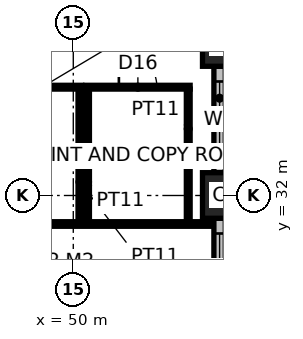
"""IFC4 building model, lengths in metres.
Left out: names, types, materials, properties, quantities, classifications, styles, units other than length and angle.
Written with IfcOpenShell. Run it as: python <this file> out.ifc"""

import sys

from ifc_helpers import new_model, si_unit, direction, frame, frame_2d, origin, origin_2d, place, context, subcontext, project, spatial, rectangle, hollow_rectangle, extrude, element, fill, save


model = new_model("IFC4")
c1 = context("Model", 3, precision=1e-05, world=origin(), true_north=direction((0.0, 1.0)))
c2 = subcontext(c1, "Body", "Model", "MODEL_VIEW")
j1 = project(units=[si_unit("LENGTHUNIT", "METRE"), si_unit("PLANEANGLEUNIT", "RADIAN")], contexts=[c1])
p1 = place(None, origin())
s1 = spatial("IfcSite", under=j1, at=p1, CompositionType="ELEMENT")
p2 = place(p1, origin())
s2 = spatial("IfcBuilding", under=s1, at=p2, CompositionType="ELEMENT")
p3 = place(p2, frame((0.0, 0.0, 51.0)))
s3 = spatial("IfcBuildingStorey", under=s2, at=p3, CompositionType="ELEMENT", Elevation=51.0)
for number, where, z_axis, x_axis in (
    (1, (54.0, 32.0, 0.0), (0.0, 0.0, 1.0), (1.0, 0.0, 0.0)),
    (2, (54.0, 36.0, 0.0), (0.0, 0.0, 1.0), (1.0, 0.0, 0.0)),
):
    element("IfcColumn", number, at=place(p3, frame(where, z_axis=z_axis, x_axis=x_axis)), inside=s3, PredefinedType="COLUMN", context=c2, shape_type="SweptSolid", body=[
        extrude(hollow_rectangle(XDim=1.2, YDim=1.2, WallThickness=0.1, at=origin_2d()), origin(), (0.0, 0.0, 1.0), 4.0),
    ])
p4 = place(p3, frame((44.375, 31.25, 0.0), z_axis=(0.0, 0.0, 1.0), x_axis=(1.0, 0.0, 0.0)))
e3 = element("IfcWall", 3, at=p4, inside=s3, PredefinedType="PARTITIONING", context=c2, shape_type="SweptSolid", body=[
    extrude(rectangle(XDim=9.325, YDim=0.12, at=frame_2d((4.663, 0.0))), origin(), (0.0, 0.0, 1.0), 3.85),
])
p5 = place(p3, frame((46.725, 34.85, 0.0), z_axis=(0.0, 0.0, 1.0), x_axis=(1.0, 0.0, 0.0)))
e4 = element("IfcWall", 4, at=p5, inside=s3, PredefinedType="PARTITIONING", context=c2, shape_type="SweptSolid", body=[
    extrude(rectangle(XDim=3.5, YDim=0.1, at=frame_2d((1.75, 0.0))), origin(), (0.0, 0.0, 1.0), 3.85),
])
p6 = place(p5, frame((1.25, 0.0, 0.0)))
e5 = element("IfcOpeningElement", 5, at=p6, cuts=e4, PredefinedType="OPENING", context=c2, shape_type="SweptSolid", body=[
    extrude(rectangle(XDim=1.0, YDim=2.2, at=frame_2d((0.5, 1.1))), frame((0.0, 0.06, 0.0), z_axis=(0.0, -1.0, 0.0), x_axis=(1.0, 0.0, 0.0)), (0.0, 0.0, 1.0), 0.12),
])
p7 = place(p3, frame((50.325, 34.85, 0.0), z_axis=(0.0, 0.0, 1.0), x_axis=(1.0, 0.0, 0.0)))
e6 = element("IfcWall", 6, at=p7, inside=s3, PredefinedType="PARTITIONING", context=c2, shape_type="SweptSolid", body=[
    extrude(rectangle(XDim=2.75, YDim=0.1, at=frame_2d((1.375, 0.0))), origin(), (0.0, 0.0, 1.0), 3.85),
])
p8 = place(p7, frame((0.875, 0.0, 0.0)))
e7 = element("IfcOpeningElement", 7, at=p8, cuts=e6, PredefinedType="OPENING", context=c2, shape_type="SweptSolid", body=[
    extrude(rectangle(XDim=1.0, YDim=2.2, at=frame_2d((0.5, 1.1))), frame((0.0, 0.06, 0.0), z_axis=(0.0, -1.0, 0.0), x_axis=(1.0, 0.0, 0.0)), (0.0, 0.0, 1.0), 0.12),
])
for number, where, z_axis, x_axis in (
    (8, (50.175, 31.31, 0.0), (0.0, 0.0, 1.0), (0.0, 1.0, 0.0)),
    (9, (50.375, 31.31, 0.0), (0.0, 0.0, 1.0), (0.0, 1.0, 0.0)),
    (10, (53.025, 31.31, 0.0), (0.0, 0.0, 1.0), (0.0, 1.0, 0.0)),
):
    element("IfcWall", number, at=place(p3, frame(where, z_axis=z_axis, x_axis=x_axis)), inside=s3, PredefinedType="PARTITIONING", context=c2, shape_type="SweptSolid", body=[
        extrude(rectangle(XDim=3.49, YDim=0.1, at=frame_2d((1.745, 0.0))), origin(), (0.0, 0.0, 1.0), 3.85),
    ])
p9 = place(p3, frame((53.85, 28.6, 0.0), z_axis=(0.0, 0.0, 1.0), x_axis=(0.0, 1.0, 0.0)))
e11 = element("IfcWall", 11, at=p9, inside=s3, PredefinedType="ELEMENTEDWALL", context=c2, shape_type="SweptSolid", body=[
    extrude(rectangle(XDim=2.8, YDim=0.3, at=frame_2d((1.4, 0.0))), origin(), (0.0, 0.0, 1.0), 2.85),
])
p10 = place(p9, frame((0.4, 0.0, 0.8)))
e12 = element("IfcOpeningElement", 12, at=p10, cuts=e11, PredefinedType="OPENING", context=c2, shape_type="SweptSolid", body=[
    extrude(rectangle(XDim=2.0, YDim=2.0, at=frame_2d((1.0, 1.0))), frame((0.0, 0.16, 0.0), z_axis=(0.0, -1.0, 0.0), x_axis=(1.0, 0.0, 0.0)), (0.0, 0.0, 1.0), 0.32),
])
p11 = place(p3, frame((53.85, 32.6, 0.0), z_axis=(0.0, 0.0, 1.0), x_axis=(0.0, 1.0, 0.0)))
e13 = element("IfcWall", 13, at=p11, inside=s3, PredefinedType="ELEMENTEDWALL", context=c2, shape_type="SweptSolid", body=[
    extrude(rectangle(XDim=2.8, YDim=0.3, at=frame_2d((1.4, 0.0))), origin(), (0.0, 0.0, 1.0), 2.85),
])
p12 = place(p11, frame((0.4, 0.0, 0.8)))
e14 = element("IfcOpeningElement", 14, at=p12, cuts=e13, PredefinedType="OPENING", context=c2, shape_type="SweptSolid", body=[
    extrude(rectangle(XDim=2.0, YDim=2.0, at=frame_2d((1.0, 1.0))), frame((0.0, 0.16, 0.0), z_axis=(0.0, -1.0, 0.0), x_axis=(1.0, 0.0, 0.0)), (0.0, 0.0, 1.0), 0.32),
])
p13 = place(p8, origin())
e15 = element("IfcDoor", 15, at=p13, inside=s3, OperationType="SINGLE_SWING_LEFT", PredefinedType="DOOR", context=c2, shape_type="SweptSolid", body=[
    extrude(rectangle(XDim=1.0, YDim=2.2, at=frame_2d((0.5, 1.1))), frame((0.0, 0.025, 0.0), z_axis=(0.0, -1.0, 0.0), x_axis=(1.0, 0.0, 0.0)), (0.0, 0.0, 1.0), 0.05),
])
fill(e7, e15)
p14 = place(p10, origin())
e16 = element("IfcWindow", 16, at=p14, inside=s3, PartitioningType="SINGLE_PANEL", PredefinedType="WINDOW", context=c2, shape_type="SweptSolid", body=[
    extrude(rectangle(XDim=2.0, YDim=2.0, at=frame_2d((1.0, 1.0))), frame((0.0, 0.03, 0.0), z_axis=(0.0, -1.0, 0.0), x_axis=(1.0, 0.0, 0.0)), (0.0, 0.0, 1.0), 0.06),
])
fill(e12, e16)
p15 = place(p12, origin())
e17 = element("IfcWindow", 17, at=p15, inside=s3, PartitioningType="SINGLE_PANEL", PredefinedType="WINDOW", context=c2, shape_type="SweptSolid", body=[
    extrude(rectangle(XDim=2.0, YDim=2.0, at=frame_2d((1.0, 1.0))), frame((0.0, 0.03, 0.0), z_axis=(0.0, -1.0, 0.0), x_axis=(1.0, 0.0, 0.0)), (0.0, 0.0, 1.0), 0.06),
])
fill(e14, e17)
save(model, sys.argv[1])
